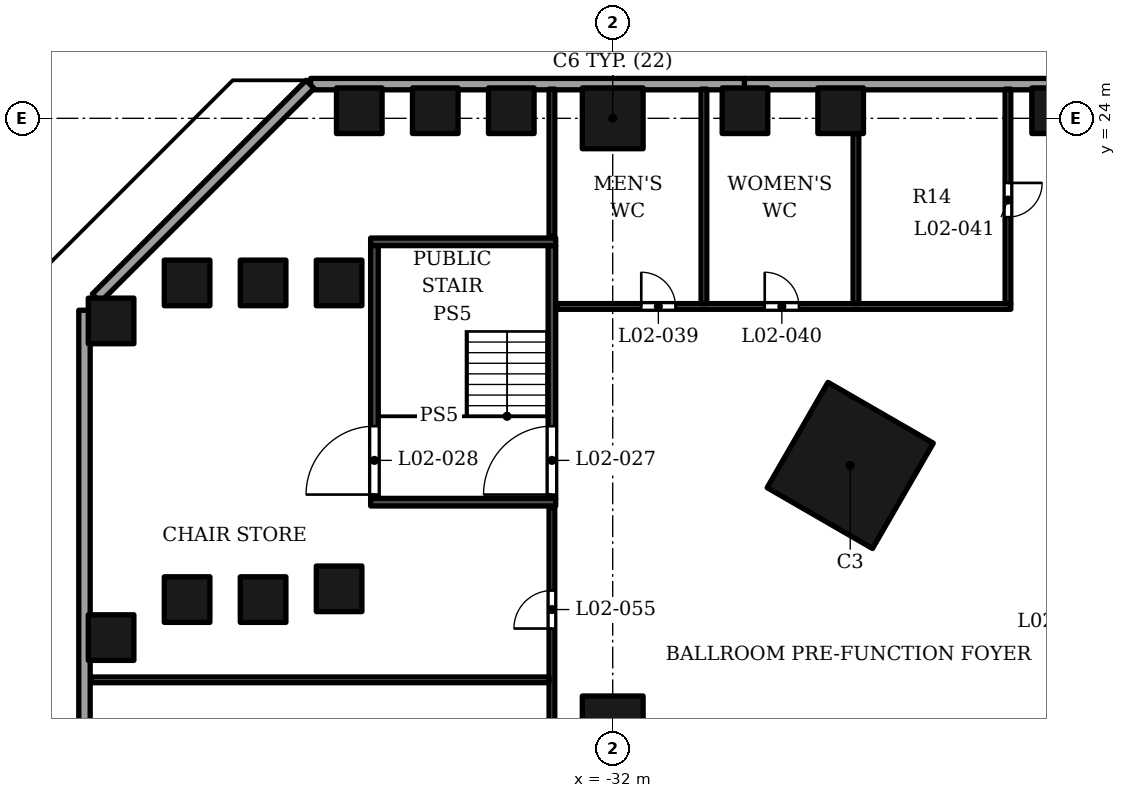
"""IFC4 building model, lengths in metres.
Left out: names, types, materials, properties, quantities, classifications, styles, units other than length and angle.
Written with IfcOpenShell. Run it as: python <this file> out.ifc"""

import sys

from ifc_helpers import new_model, si_unit, direction, frame, frame_2d, origin, origin_2d, place, context, subcontext, project, spatial, rectangle, extrude, element, fill, save


model = new_model("IFC4")
c1 = context("Model", 3, precision=1e-05, world=origin(), true_north=direction((0.0, 1.0)))
c2 = subcontext(c1, "Body", "Model", "MODEL_VIEW")
j1 = project(units=[si_unit("LENGTHUNIT", "METRE"), si_unit("PLANEANGLEUNIT", "RADIAN")], contexts=[c1])
p1 = place(None, origin())
s1 = spatial("IfcSite", under=j1, at=p1, CompositionType="ELEMENT")
p2 = place(p1, origin())
s2 = spatial("IfcBuilding", under=s1, at=p2, CompositionType="ELEMENT")
p3 = place(p2, frame((0.0, 0.0, 20.0)))
s3 = spatial("IfcBuildingStorey", under=s2, at=p3, CompositionType="ELEMENT", Elevation=20.0)
for number, where, z_axis, x_axis in (
    (1, (-32.0, 8.0, 0.0), (0.0, 0.0, 1.0), (1.0, 0.0, 0.0)),
    (2, (-32.0, 24.0, 0.0), (0.0, 0.0, 1.0), (1.0, 0.0, 0.0)),
):
    element("IfcColumn", number, at=place(p3, frame(where, z_axis=z_axis, x_axis=x_axis)), inside=s3, PredefinedType="COLUMN", context=c2, shape_type="SweptSolid", body=[
        extrude(rectangle(XDim=1.6, YDim=1.6, at=origin_2d()), origin(), (0.0, 0.0, 1.0), 9.0),
    ])
for number, where, z_axis, x_axis in (
    (3, (-39.2, 19.669, 0.0), (0.0, 0.0, 1.0), (1.0, 0.0, 0.0)),
    (4, (-34.669, 24.2, 0.0), (0.0, 0.0, 1.0), (1.0, 0.0, 0.0)),
    (5, (-39.2, 11.62, 0.0), (0.0, 0.0, 1.0), (1.0, 0.0, 0.0)),
    (6, (-26.002, 24.2, 0.0), (0.0, 0.0, 1.0), (1.0, 0.0, 0.0)),
    (7, (-41.2, 19.669, 0.0), (0.0, 0.0, 1.0), (1.0, 0.0, 0.0)),
    (8, (-36.669, 24.2, 0.0), (0.0, 0.0, 1.0), (1.0, 0.0, 0.0)),
    (9, (-41.2, 11.337, 0.0), (0.0, 0.0, 1.0), (1.0, 0.0, 0.0)),
    (10, (-28.52, 24.2, 0.0), (0.0, 0.0, 1.0), (1.0, 0.0, 0.0)),
    (11, (-20.372, 24.2, 0.0), (0.0, 0.0, 1.0), (1.0, 0.0, 0.0)),
    (12, (-43.2, 19.669, 0.0), (0.0, 0.0, 1.0), (1.0, 0.0, 0.0)),
    (13, (-38.669, 24.2, 0.0), (0.0, 0.0, 1.0), (1.0, 0.0, 0.0)),
    (14, (-43.2, 11.337, 0.0), (0.0, 0.0, 1.0), (1.0, 0.0, 0.0)),
    (15, (-45.2, 18.669, 0.0), (0.0, 0.0, 1.0), (1.0, 0.0, 0.0)),
    (16, (-45.2, 10.337, 0.0), (0.0, 0.0, 1.0), (1.0, 0.0, 0.0)),
):
    element("IfcColumn", number, at=place(p3, frame(where, z_axis=z_axis, x_axis=x_axis)), inside=s3, PredefinedType="COLUMN", context=c2, shape_type="SweptSolid", body=[
        extrude(rectangle(XDim=1.2, YDim=1.2, at=origin_2d()), origin(), (0.0, 0.0, 1.0), 9.0),
    ])
p4 = place(p3, frame((-25.75, 14.867, 0.0), z_axis=(0.0, 0.0, 1.0), x_axis=(0.866025386331, -0.50000003023, 0.0)))
e17 = element("IfcColumn", 17, at=p4, inside=s3, PredefinedType="COLUMN", context=c2, shape_type="SweptSolid", body=[
    extrude(rectangle(XDim=3.2, YDim=3.2, at=origin_2d()), origin(), (0.0, 0.0, 1.0), 9.0),
])
for number, where, z_axis, x_axis in (
    (18, (-17.121, 24.9, 0.0), (0.0, 0.0, 1.0), (-1.0, 0.0, 0.0)),
    (19, (-28.536, 24.9, 0.0), (0.0, 0.0, 1.0), (-1.0, 0.0, 0.0)),
):
    element("IfcWall", number, at=place(p3, frame(where, z_axis=z_axis, x_axis=x_axis)), inside=s3, PredefinedType="SOLIDWALL", context=c2, shape_type="SweptSolid", body=[
        extrude(rectangle(XDim=11.414, YDim=0.3, at=frame_2d((5.707, 0.0))), origin(), (0.0, 0.0, 1.0), 7.6),
    ])
p5 = place(p3, frame((-39.965, 24.894, 0.0), z_axis=(0.0, 0.0, 1.0), x_axis=(-0.707106781187, -0.707106781187, 0.0)))
e20 = element("IfcWall", 20, at=p5, inside=s3, PredefinedType="SOLIDWALL", context=c2, shape_type="SweptSolid", body=[
    extrude(rectangle(XDim=7.952, YDim=0.3, at=frame_2d((3.976, 0.0))), origin(), (0.0, 0.0, 1.0), 7.6),
])
p6 = place(p3, frame((-45.9, 18.95, 0.0), z_axis=(0.0, 0.0, 1.0), x_axis=(0.0, -1.0, 0.0)))
e21 = element("IfcWall", 21, at=p6, inside=s3, PredefinedType="SOLIDWALL", context=c2, shape_type="SweptSolid", body=[
    extrude(rectangle(XDim=11.78, YDim=0.3, at=frame_2d((5.89, 0.0))), origin(), (0.0, 0.0, 1.0), 7.6),
])
p7 = place(p3, frame((-39.894, 24.894, 9.0), z_axis=(0.0, 0.0, 1.0), x_axis=(-0.707106781187, -0.707106781187, 0.0)))
e22 = element("IfcWall", 22, at=p7, inside=s3, PredefinedType="PARAPET", context=c2, shape_type="SweptSolid", body=[
    extrude(rectangle(XDim=8.485, YDim=0.3, at=frame_2d((4.243, 0.0))), origin(), (0.0, 0.0, 1.0), 1.1),
])
p8 = place(p3, frame((-45.85, 18.79, 9.0), z_axis=(0.0, 0.0, 1.0), x_axis=(0.0, -1.0, 0.0)))
e23 = element("IfcWall", 23, at=p8, inside=s3, PredefinedType="PARAPET", context=c2, shape_type="SweptSolid", body=[
    extrude(rectangle(XDim=14.698, YDim=0.3, at=frame_2d((7.349, 0.0))), origin(), (0.0, 0.0, 1.0), 1.1),
])
for number, where, z_axis, x_axis in (
    (24, (-38.37, 13.9, 0.0), (0.0, 0.0, 1.0), (1.0, 0.0, 0.0)),
    (25, (-38.37, 20.75, 0.0), (0.0, 0.0, 1.0), (1.0, 0.0, 0.0)),
):
    element("IfcWall", number, at=place(p3, frame(where, z_axis=z_axis, x_axis=x_axis)), inside=s3, PredefinedType="SOLIDWALL", context=c2, shape_type="SweptSolid", body=[
        extrude(rectangle(XDim=4.87, YDim=0.2, at=frame_2d((2.435, 0.0))), origin(), (0.0, 0.0, 1.0), 8.55),
    ])
p9 = place(p3, frame((-38.27, 14.0, 0.0), z_axis=(0.0, 0.0, 1.0), x_axis=(0.0, 1.0, 0.0)))
e26 = element("IfcWall", 26, at=p9, inside=s3, PredefinedType="SOLIDWALL", context=c2, shape_type="SweptSolid", body=[
    extrude(rectangle(XDim=6.65, YDim=0.2, at=frame_2d((3.325, 0.0))), origin(), (0.0, 0.0, 1.0), 8.55),
])
p10 = place(p9, frame((0.1, 0.0, 0.0)))
e27 = element("IfcOpeningElement", 27, at=p10, cuts=e26, PredefinedType="OPENING", context=c2, shape_type="SweptSolid", body=[
    extrude(rectangle(XDim=1.8, YDim=2.4, at=frame_2d((0.9, 1.2))), frame((0.0, 0.11, 0.0), z_axis=(0.0, -1.0, 0.0), x_axis=(1.0, 0.0, 0.0)), (0.0, 0.0, 1.0), 0.22),
])
p11 = place(p3, frame((-33.6, 14.0, 0.0), z_axis=(0.0, 0.0, 1.0), x_axis=(0.0, 1.0, 0.0)))
e28 = element("IfcWall", 28, at=p11, inside=s3, PredefinedType="SOLIDWALL", context=c2, shape_type="SweptSolid", body=[
    extrude(rectangle(XDim=6.65, YDim=0.2, at=frame_2d((3.325, 0.0))), origin(), (0.0, 0.0, 1.0), 8.55),
])
p12 = place(p11, frame((0.1, 0.0, 0.0)))
e29 = element("IfcOpeningElement", 29, at=p12, cuts=e28, PredefinedType="OPENING", context=c2, shape_type="SweptSolid", body=[
    extrude(rectangle(XDim=1.8, YDim=2.4, at=frame_2d((0.9, 1.2))), frame((0.0, 0.11, 0.0), z_axis=(0.0, -1.0, 0.0), x_axis=(1.0, 0.0, 0.0)), (0.0, 0.0, 1.0), 0.22),
])
p13 = place(p3, frame((-33.6, 4.69, 0.0), z_axis=(0.0, 0.0, 1.0), x_axis=(0.0, 1.0, 0.0)))
e30 = element("IfcWall", 30, at=p13, inside=s3, PredefinedType="PARTITIONING", context=c2, shape_type="SweptSolid", body=[
    extrude(rectangle(XDim=9.07, YDim=0.15, at=frame_2d((4.535, 0.0))), origin(), (0.0, 0.0, 1.0), 7.35),
])
p14 = place(p13, frame((0.261, 0.0, 0.0)))
e31 = element("IfcOpeningElement", 31, at=p14, cuts=e30, PredefinedType="OPENING", context=c2, shape_type="SweptSolid", body=[
    extrude(rectangle(XDim=1.0, YDim=2.1, at=frame_2d((0.5, 1.05))), frame((0.0, 0.085, 0.0), z_axis=(0.0, -1.0, 0.0), x_axis=(1.0, 0.0, 0.0)), (0.0, 0.0, 1.0), 0.17),
])
p15 = place(p13, frame((5.885, 0.0, 0.0)))
e32 = element("IfcOpeningElement", 32, at=p15, cuts=e30, PredefinedType="OPENING", context=c2, shape_type="SweptSolid", body=[
    extrude(rectangle(XDim=1.0, YDim=2.1, at=frame_2d((0.5, 1.05))), frame((0.0, 0.085, 0.0), z_axis=(0.0, -1.0, 0.0), x_axis=(1.0, 0.0, 0.0)), (0.0, 0.0, 1.0), 0.17),
])
p16 = place(p3, frame((-45.72, 9.225, 0.0), z_axis=(0.0, 0.0, 1.0), x_axis=(1.0, 0.0, 0.0)))
e33 = element("IfcWall", 33, at=p16, inside=s3, PredefinedType="PARTITIONING", context=c2, shape_type="SweptSolid", body=[
    extrude(rectangle(XDim=12.045, YDim=0.15, at=frame_2d((6.022, 0.0))), origin(), (0.0, 0.0, 1.0), 7.65),
])
p17 = place(p3, frame((-33.46, 19.05, 0.0), z_axis=(0.0, 0.0, 1.0), x_axis=(1.0, 0.0, 0.0)))
e34 = element("IfcWall", 34, at=p17, inside=s3, PredefinedType="PARTITIONING", context=c2, shape_type="SweptSolid", body=[
    extrude(rectangle(XDim=11.935, YDim=0.15, at=frame_2d((5.968, 0.0))), origin(), (0.0, 0.0, 1.0), 7.35),
])
p18 = place(p17, frame((2.211, 0.0, 0.0)))
e35 = element("IfcOpeningElement", 35, at=p18, cuts=e34, PredefinedType="OPENING", context=c2, shape_type="SweptSolid", body=[
    extrude(rectangle(XDim=0.9, YDim=2.1, at=frame_2d((0.45, 1.05))), frame((0.0, 0.085, 0.0), z_axis=(0.0, -1.0, 0.0), x_axis=(1.0, 0.0, 0.0)), (0.0, 0.0, 1.0), 0.17),
])
p19 = place(p17, frame((5.46, 0.0, 0.0)))
e36 = element("IfcOpeningElement", 36, at=p19, cuts=e34, PredefinedType="OPENING", context=c2, shape_type="SweptSolid", body=[
    extrude(rectangle(XDim=0.9, YDim=2.1, at=frame_2d((0.45, 1.05))), frame((0.0, 0.085, 0.0), z_axis=(0.0, -1.0, 0.0), x_axis=(1.0, 0.0, 0.0)), (0.0, 0.0, 1.0), 0.17),
])
p20 = place(p3, frame((-29.6, 19.125, 0.0), z_axis=(0.0, 0.0, 1.0), x_axis=(0.0, 1.0, 0.0)))
e37 = element("IfcWall", 37, at=p20, inside=s3, PredefinedType="PARTITIONING", context=c2, shape_type="SweptSolid", body=[
    extrude(rectangle(XDim=5.645, YDim=0.15, at=frame_2d((2.823, 0.0))), origin(), (0.0, 0.0, 1.0), 7.35),
])
p21 = place(p3, frame((-25.6, 19.125, 0.0), z_axis=(0.0, 0.0, 1.0), x_axis=(0.0, 1.0, 0.0)))
e38 = element("IfcWall", 38, at=p21, inside=s3, PredefinedType="PARTITIONING", context=c2, shape_type="SweptSolid", body=[
    extrude(rectangle(XDim=4.475, YDim=0.15, at=frame_2d((2.238, 0.0))), origin(), (0.0, 0.0, 1.0), 8.55),
])
p22 = place(p3, frame((-21.6, 19.125, 0.0), z_axis=(0.0, 0.0, 1.0), x_axis=(0.0, 1.0, 0.0)))
e39 = element("IfcWall", 39, at=p22, inside=s3, PredefinedType="PARTITIONING", context=c2, shape_type="SweptSolid", body=[
    extrude(rectangle(XDim=5.645, YDim=0.15, at=frame_2d((2.823, 0.0))), origin(), (0.0, 0.0, 1.0), 7.35),
])
p23 = place(p22, frame((2.275, 0.0, 0.0)))
e40 = element("IfcOpeningElement", 40, at=p23, cuts=e39, PredefinedType="OPENING", context=c2, shape_type="SweptSolid", body=[
    extrude(rectangle(XDim=0.9, YDim=2.1, at=frame_2d((0.45, 1.05))), frame((0.0, 0.085, 0.0), z_axis=(0.0, -1.0, 0.0), x_axis=(1.0, 0.0, 0.0)), (0.0, 0.0, 1.0), 0.17),
])
p24 = place(p3, frame((-33.6, 20.89, 0.0), z_axis=(0.0, 0.0, 1.0), x_axis=(0.0, 1.0, 0.0)))
e41 = element("IfcWall", 41, at=p24, inside=s3, PredefinedType="PARTITIONING", context=c2, shape_type="SweptSolid", body=[
    extrude(rectangle(XDim=3.88, YDim=0.15, at=frame_2d((1.94, 0.0))), origin(), (0.0, 0.0, 1.0), 7.65),
])
p25 = place(p12, origin())
e42 = element("IfcDoor", 42, at=p25, inside=s3, OperationType="DOUBLE_DOOR_SINGLE_SWING", PredefinedType="DOOR", context=c2, shape_type="SweptSolid", body=[
    extrude(rectangle(XDim=1.8, YDim=2.4, at=frame_2d((0.9, 1.2))), frame((0.0, 0.025, 0.0), z_axis=(0.0, -1.0, 0.0), x_axis=(1.0, 0.0, 0.0)), (0.0, 0.0, 1.0), 0.05),
])
fill(e29, e42)
p26 = place(p10, origin())
e43 = element("IfcDoor", 43, at=p26, inside=s3, OperationType="DOUBLE_DOOR_SINGLE_SWING", PredefinedType="DOOR", context=c2, shape_type="SweptSolid", body=[
    extrude(rectangle(XDim=1.8, YDim=2.4, at=frame_2d((0.9, 1.2))), frame((0.0, 0.025, 0.0), z_axis=(0.0, -1.0, 0.0), x_axis=(1.0, 0.0, 0.0)), (0.0, 0.0, 1.0), 0.05),
])
fill(e27, e43)
p27 = place(p18, origin())
e44 = element("IfcDoor", 44, at=p27, inside=s3, OperationType="SINGLE_SWING_LEFT", PredefinedType="DOOR", context=c2, shape_type="SweptSolid", body=[
    extrude(rectangle(XDim=0.9, YDim=2.1, at=frame_2d((0.45, 1.05))), frame((0.0, 0.025, 0.0), z_axis=(0.0, -1.0, 0.0), x_axis=(1.0, 0.0, 0.0)), (0.0, 0.0, 1.0), 0.05),
])
fill(e35, e44)
p28 = place(p19, origin())
e45 = element("IfcDoor", 45, at=p28, inside=s3, OperationType="SINGLE_SWING_LEFT", PredefinedType="DOOR", context=c2, shape_type="SweptSolid", body=[
    extrude(rectangle(XDim=0.9, YDim=2.1, at=frame_2d((0.45, 1.05))), frame((0.0, 0.025, 0.0), z_axis=(0.0, -1.0, 0.0), x_axis=(1.0, 0.0, 0.0)), (0.0, 0.0, 1.0), 0.05),
])
fill(e36, e45)
p29 = place(p23, origin())
e46 = element("IfcDoor", 46, at=p29, inside=s3, OperationType="SINGLE_SWING_RIGHT", PredefinedType="DOOR", context=c2, shape_type="SweptSolid", body=[
    extrude(rectangle(XDim=0.9, YDim=2.1, at=frame_2d((0.45, 1.05))), frame((0.0, 0.025, 0.0), z_axis=(0.0, -1.0, 0.0), x_axis=(1.0, 0.0, 0.0)), (0.0, 0.0, 1.0), 0.05),
])
fill(e40, e46)
p30 = place(p15, origin())
e47 = element("IfcDoor", 47, at=p30, inside=s3, OperationType="SINGLE_SWING_LEFT", PredefinedType="DOOR", context=c2, shape_type="SweptSolid", body=[
    extrude(rectangle(XDim=1.0, YDim=2.1, at=frame_2d((0.5, 1.05))), frame((0.0, 0.025, 0.0), z_axis=(0.0, -1.0, 0.0), x_axis=(1.0, 0.0, 0.0)), (0.0, 0.0, 1.0), 0.05),
])
fill(e32, e47)
save(model, sys.argv[1])
